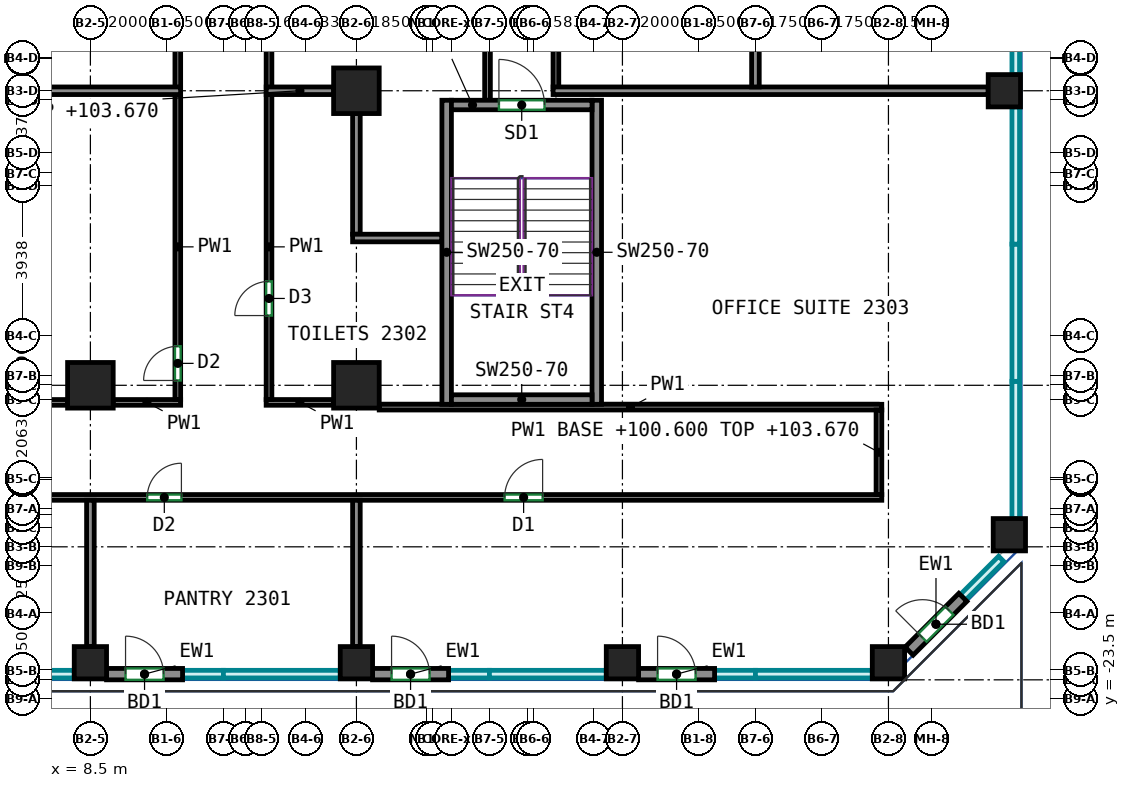
"""IFC4 building model, lengths in metres.
Left out: names, types, materials, properties, quantities, classifications, styles, units other than length and angle.
Written with IfcOpenShell. Run it as: python <this file> out.ifc"""

import sys

from ifc_helpers import new_model, si_unit, direction, frame, frame_2d, origin, origin_2d, place, context, subcontext, project, spatial, rectangle, extrude, source, transform, mapped, element, fill, save


model = new_model("IFC4")
c1 = context("Model", 3, precision=1e-05, world=origin(), true_north=direction((0.0, 1.0)))
c2 = subcontext(c1, "Body", "Model", "MODEL_VIEW")
j1 = project(units=[si_unit("LENGTHUNIT", "METRE"), si_unit("PLANEANGLEUNIT", "RADIAN")], contexts=[c1])
p1 = place(None, origin())
s1 = spatial("IfcSite", under=j1, at=p1, CompositionType="ELEMENT")
p2 = place(p1, origin())
s2 = spatial("IfcBuilding", under=s1, at=p2, CompositionType="ELEMENT")
p3 = place(p2, frame((0.0, 0.0, 100.6)))
s3 = spatial("IfcBuildingStorey", under=s2, at=p3, CompositionType="ELEMENT", Elevation=100.6)
m1 = source(origin(), c2, "Body", "SweptSolid", [
    extrude(rectangle(XDim=0.85, YDim=0.85, at=origin_2d()), origin(), (0.0, 0.0, 1.0), 3.72),
])
p4 = place(p3, frame((8.5, -22.55, 0.0), z_axis=(0.0, 0.0, 1.0), x_axis=(1.0, 0.0, 0.0)))
e1 = element("IfcColumn", 1, at=p4, inside=s3, PredefinedType="COLUMN", context=c2, shape_type="MappedRepresentation", body=[
    mapped(m1, transform((0.0, 0.0, 0.0))),
])
m2 = source(origin(), c2, "Body", "SweptSolid", [
    extrude(rectangle(XDim=1.2, YDim=1.2, at=origin_2d()), origin(), (0.0, 0.0, 1.0), 3.72),
])
p5 = place(p3, frame((8.5, -15.25, 0.0), z_axis=(0.0, 0.0, 1.0), x_axis=(1.0, 0.0, 0.0)))
e2 = element("IfcColumn", 2, at=p5, inside=s3, PredefinedType="COLUMN", context=c2, shape_type="MappedRepresentation", body=[
    mapped(m2, transform((0.0, 0.0, 0.0))),
])
p6 = place(p3, frame((15.5, -22.55, 0.0), z_axis=(0.0, 0.0, 1.0), x_axis=(1.0, 0.0, 0.0)))
e3 = element("IfcColumn", 3, at=p6, inside=s3, PredefinedType="COLUMN", context=c2, shape_type="MappedRepresentation", body=[
    mapped(m1, transform((0.0, 0.0, 0.0))),
])
for number, where, z_axis, x_axis in (
    (4, (15.5, -15.25, 0.0), (0.0, 0.0, 1.0), (1.0, 0.0, 0.0)),
    (5, (15.5, -7.5, 0.0), (0.0, 0.0, 1.0), (1.0, 0.0, 0.0)),
):
    element("IfcColumn", number, at=place(p3, frame(where, z_axis=z_axis, x_axis=x_axis)), inside=s3, PredefinedType="COLUMN", context=c2, shape_type="MappedRepresentation", body=[
        mapped(m2, transform((0.0, 0.0, 0.0))),
    ])
for number, where, z_axis, x_axis in (
    (6, (22.5, -22.55, 0.0), (0.0, 0.0, 1.0), (1.0, 0.0, 0.0)),
    (7, (29.5, -22.55, 0.0), (0.0, 0.0, 1.0), (1.0, 0.0, 0.0)),
    (8, (32.55, -7.5, 0.0), (0.0, 0.0, 1.0), (1.0, 0.0, 0.0)),
    (9, (32.682, -19.182, 0.0), (0.0, 0.0, 1.0), (1.0, 0.0, 0.0)),
):
    element("IfcColumn", number, at=place(p3, frame(where, z_axis=z_axis, x_axis=x_axis)), inside=s3, PredefinedType="COLUMN", context=c2, shape_type="MappedRepresentation", body=[
        mapped(m1, transform((0.0, 0.0, 0.0))),
    ])
m3 = source(origin(), c2, "Body", "SweptSolid", [
    extrude(rectangle(XDim=8.0, YDim=0.25, at=frame_2d((4.0, 0.0))), origin(), (0.0, 0.0, 1.0), 3.72),
])
for number, where, z_axis, x_axis in (
    (10, (17.875, -15.75, 0.0), (0.0, 0.0, 1.0), (0.0, 1.0, 0.0)),
    (11, (21.825, -15.75, 0.0), (0.0, 0.0, 1.0), (0.0, 1.0, 0.0)),
):
    element("IfcWall", number, at=place(p3, frame(where, z_axis=z_axis, x_axis=x_axis)), inside=s3, PredefinedType="SHEAR", context=c2, shape_type="MappedRepresentation", body=[
        mapped(m3, transform((0.0, 0.0, 0.0))),
    ])
m4 = source(origin(), c2, "Body", "SweptSolid", [
    extrude(rectangle(XDim=3.7, YDim=0.25, at=frame_2d((1.85, 0.0))), origin(), (0.0, 0.0, 1.0), 3.72),
])
p7 = place(p3, frame((18.0, -15.625, 0.0), z_axis=(0.0, 0.0, 1.0), x_axis=(1.0, 0.0, 0.0)))
e12 = element("IfcWall", 12, at=p7, inside=s3, PredefinedType="SHEAR", context=c2, shape_type="MappedRepresentation", body=[
    mapped(m4, transform((0.0, 0.0, 0.0))),
])
p8 = place(p3, frame((18.0, -7.875, 0.0), z_axis=(0.0, 0.0, 1.0), x_axis=(1.0, 0.0, 0.0)))
e13 = element("IfcWall", 13, at=p8, inside=s3, PredefinedType="SHEAR", context=c2, shape_type="MappedRepresentation", body=[
    mapped(m4, transform((0.0, 0.0, 0.0))),
])
p9 = place(p8, frame((1.25, 0.0, 0.0)))
e14 = element("IfcOpeningElement", 14, at=p9, cuts=e13, PredefinedType="OPENING", context=c2, shape_type="SweptSolid", body=[
    extrude(rectangle(XDim=1.2, YDim=2.1, at=frame_2d((0.6, 1.05))), frame((0.0, 0.135, 0.0), z_axis=(0.0, -1.0, 0.0), x_axis=(1.0, 0.0, 0.0)), (0.0, 0.0, 1.0), 0.27),
])
m5 = source(origin(), c2, "Body", "SweptSolid", [
    extrude(rectangle(XDim=2.0, YDim=0.3, at=frame_2d((1.0, 0.0))), origin(), (0.0, 0.0, 1.0), 3.72),
])
p10 = place(p3, frame((8.925, -22.85, 0.0), z_axis=(0.0, 0.0, 1.0), x_axis=(1.0, 0.0, 0.0)))
e15 = element("IfcWall", 15, at=p10, inside=s3, PredefinedType="SOLIDWALL", context=c2, shape_type="MappedRepresentation", body=[
    mapped(m5, transform((0.0, 0.0, 0.0))),
])
p11 = place(p10, frame((0.5, 0.0, 0.0)))
e16 = element("IfcOpeningElement", 16, at=p11, cuts=e15, PredefinedType="OPENING", context=c2, shape_type="SweptSolid", body=[
    extrude(rectangle(XDim=1.0, YDim=2.1, at=frame_2d((0.5, 1.05))), frame((0.0, 0.16, 0.0), z_axis=(0.0, -1.0, 0.0), x_axis=(1.0, 0.0, 0.0)), (0.0, 0.0, 1.0), 0.32),
])
p12 = place(p3, frame((15.925, -22.85, 0.0), z_axis=(0.0, 0.0, 1.0), x_axis=(1.0, 0.0, 0.0)))
e17 = element("IfcWall", 17, at=p12, inside=s3, PredefinedType="SOLIDWALL", context=c2, shape_type="MappedRepresentation", body=[
    mapped(m5, transform((0.0, 0.0, 0.0))),
])
p13 = place(p12, frame((0.5, 0.0, 0.0)))
e18 = element("IfcOpeningElement", 18, at=p13, cuts=e17, PredefinedType="OPENING", context=c2, shape_type="SweptSolid", body=[
    extrude(rectangle(XDim=1.0, YDim=2.1, at=frame_2d((0.5, 1.05))), frame((0.0, 0.16, 0.0), z_axis=(0.0, -1.0, 0.0), x_axis=(1.0, 0.0, 0.0)), (0.0, 0.0, 1.0), 0.32),
])
p14 = place(p3, frame((22.925, -22.85, 0.0), z_axis=(0.0, 0.0, 1.0), x_axis=(1.0, 0.0, 0.0)))
e19 = element("IfcWall", 19, at=p14, inside=s3, PredefinedType="SOLIDWALL", context=c2, shape_type="MappedRepresentation", body=[
    mapped(m5, transform((0.0, 0.0, 0.0))),
])
p15 = place(p14, frame((0.5, 0.0, 0.0)))
e20 = element("IfcOpeningElement", 20, at=p15, cuts=e19, PredefinedType="OPENING", context=c2, shape_type="SweptSolid", body=[
    extrude(rectangle(XDim=1.0, YDim=2.1, at=frame_2d((0.5, 1.05))), frame((0.0, 0.16, 0.0), z_axis=(0.0, -1.0, 0.0), x_axis=(1.0, 0.0, 0.0)), (0.0, 0.0, 1.0), 0.32),
])
p16 = place(p3, frame((30.044, -22.244, 0.0), z_axis=(0.0, 0.0, 1.0), x_axis=(0.707045742145, 0.70716781496, 0.0)))
e21 = element("IfcWall", 21, at=p16, inside=s3, PredefinedType="SOLIDWALL", context=c2, shape_type="MappedRepresentation", body=[
    mapped(m5, transform((0.0, 0.0, 0.0))),
])
p17 = place(p16, frame((0.5, 0.0, 0.0)))
e22 = element("IfcOpeningElement", 22, at=p17, cuts=e21, PredefinedType="OPENING", context=c2, shape_type="SweptSolid", body=[
    extrude(rectangle(XDim=1.0, YDim=2.1, at=frame_2d((0.5, 1.05))), frame((0.0, 0.16, 0.0), z_axis=(0.0, -1.0, 0.0), x_axis=(1.0, 0.0, 0.0)), (0.0, 0.0, 1.0), 0.32),
])
p18 = place(p3, frame((-19.325, -18.2, 0.0), z_axis=(0.0, 0.0, 1.0), x_axis=(1.0, 0.0, 0.0)))
e23 = element("IfcWall", 23, at=p18, inside=s3, PredefinedType="PARTITIONING", context=c2, shape_type="SweptSolid", body=[
    extrude(rectangle(XDim=48.65, YDim=0.15, at=frame_2d((24.325, 0.0))), origin(), (0.0, 0.0, 1.0), 3.72),
])
p19 = place(p18, frame((6.208, 0.0, 0.0)))
e24 = element("IfcOpeningElement", 24, at=p19, cuts=e23, PredefinedType="OPENING", context=c2, shape_type="SweptSolid", body=[
    extrude(rectangle(XDim=1.8, YDim=2.1, at=frame_2d((0.9, 1.05))), frame((0.0, 0.085, 0.0), z_axis=(0.0, -1.0, 0.0), x_axis=(1.0, 0.0, 0.0)), (0.0, 0.0, 1.0), 0.17),
])
p20 = place(p18, frame((29.32, 0.0, 0.0)))
e25 = element("IfcOpeningElement", 25, at=p20, cuts=e23, PredefinedType="OPENING", context=c2, shape_type="SweptSolid", body=[
    extrude(rectangle(XDim=0.9, YDim=2.1, at=frame_2d((0.45, 1.05))), frame((0.0, 0.085, 0.0), z_axis=(0.0, -1.0, 0.0), x_axis=(1.0, 0.0, 0.0)), (0.0, 0.0, 1.0), 0.17),
])
p21 = place(p18, frame((38.725, 0.0, 0.0)))
e26 = element("IfcOpeningElement", 26, at=p21, cuts=e23, PredefinedType="OPENING", context=c2, shape_type="SweptSolid", body=[
    extrude(rectangle(XDim=1.0, YDim=2.1, at=frame_2d((0.5, 1.05))), frame((0.0, 0.085, 0.0), z_axis=(0.0, -1.0, 0.0), x_axis=(1.0, 0.0, 0.0)), (0.0, 0.0, 1.0), 0.17),
])
p22 = place(p3, frame((2.1, -15.7, 0.0), z_axis=(0.0, 0.0, 1.0), x_axis=(1.0, 0.0, 0.0)))
e27 = element("IfcWall", 27, at=p22, inside=s3, PredefinedType="PARTITIONING", context=c2, shape_type="SweptSolid", body=[
    extrude(rectangle(XDim=5.8, YDim=0.15, at=frame_2d((2.9, 0.0))), origin(), (0.0, 0.0, 1.0), 3.72),
])
p23 = place(p3, frame((9.1, -15.7, 0.0), z_axis=(0.0, 0.0, 1.0), x_axis=(1.0, 0.0, 0.0)))
e28 = element("IfcWall", 28, at=p23, inside=s3, PredefinedType="PARTITIONING", context=c2, shape_type="SweptSolid", body=[
    extrude(rectangle(XDim=1.775, YDim=0.15, at=frame_2d((0.887, 0.0))), origin(), (0.0, 0.0, 1.0), 3.72),
])
p24 = place(p3, frame((10.8, -15.625, 0.0), z_axis=(0.0, 0.0, 1.0), x_axis=(0.0, 1.0, 0.0)))
e29 = element("IfcWall", 29, at=p24, inside=s3, PredefinedType="PARTITIONING", context=c2, shape_type="SweptSolid", body=[
    extrude(rectangle(XDim=8.035, YDim=0.15, at=frame_2d((4.018, 0.0))), origin(), (0.0, 0.0, 1.0), 3.72),
])
p25 = place(p24, frame((0.502, 0.0, 0.0)))
e30 = element("IfcOpeningElement", 30, at=p25, cuts=e29, PredefinedType="OPENING", context=c2, shape_type="SweptSolid", body=[
    extrude(rectangle(XDim=0.9, YDim=2.1, at=frame_2d((0.45, 1.05))), frame((0.0, 0.085, 0.0), z_axis=(0.0, -1.0, 0.0), x_axis=(1.0, 0.0, 0.0)), (0.0, 0.0, 1.0), 0.17),
])
p26 = place(p3, frame((10.8, -7.41, 0.0), z_axis=(0.0, 0.0, 1.0), x_axis=(0.0, 1.0, 0.0)))
e31 = element("IfcWall", 31, at=p26, inside=s3, PredefinedType="PARTITIONING", context=c2, shape_type="SweptSolid", body=[
    extrude(rectangle(XDim=10.285, YDim=0.15, at=frame_2d((5.143, 0.0))), origin(), (0.0, 0.0, 1.0), 3.72),
])
p27 = place(p26, frame((6.56, 0.0, 0.0)))
e32 = element("IfcOpeningElement", 32, at=p27, cuts=e31, PredefinedType="OPENING", context=c2, shape_type="SweptSolid", body=[
    extrude(rectangle(XDim=0.9, YDim=2.1, at=frame_2d((0.45, 1.05))), frame((0.0, 0.085, 0.0), z_axis=(0.0, -1.0, 0.0), x_axis=(1.0, 0.0, 0.0)), (0.0, 0.0, 1.0), 0.17),
])
p28 = place(p3, frame((13.125, -15.7, 0.0), z_axis=(0.0, 0.0, 1.0), x_axis=(1.0, 0.0, 0.0)))
e33 = element("IfcWall", 33, at=p28, inside=s3, PredefinedType="PARTITIONING", context=c2, shape_type="SweptSolid", body=[
    extrude(rectangle(XDim=1.775, YDim=0.15, at=frame_2d((0.887, 0.0))), origin(), (0.0, 0.0, 1.0), 3.72),
])
p29 = place(p3, frame((16.1, -15.825, 0.0), z_axis=(0.0, 0.0, 1.0), x_axis=(1.0, 0.0, 0.0)))
e34 = element("IfcWall", 34, at=p29, inside=s3, PredefinedType="PARTITIONING", context=c2, shape_type="SweptSolid", body=[
    extrude(rectangle(XDim=13.225, YDim=0.15, at=frame_2d((6.612, 0.0))), origin(), (0.0, 0.0, 1.0), 3.72),
])
p30 = place(p3, frame((13.2, -15.625, 0.0), z_axis=(0.0, 0.0, 1.0), x_axis=(0.0, 1.0, 0.0)))
e35 = element("IfcWall", 35, at=p30, inside=s3, PredefinedType="PARTITIONING", context=c2, shape_type="SweptSolid", body=[
    extrude(rectangle(XDim=8.035, YDim=0.15, at=frame_2d((4.018, 0.0))), origin(), (0.0, 0.0, 1.0), 3.72),
])
p31 = place(p30, frame((2.21, 0.0, 0.0)))
e36 = element("IfcOpeningElement", 36, at=p31, cuts=e35, PredefinedType="OPENING", context=c2, shape_type="SweptSolid", body=[
    extrude(rectangle(XDim=0.9, YDim=2.1, at=frame_2d((0.45, 1.05))), frame((0.0, 0.085, 0.0), z_axis=(0.0, -1.0, 0.0), x_axis=(1.0, 0.0, 0.0)), (0.0, 0.0, 1.0), 0.17),
])
p32 = place(p3, frame((29.25, -18.125, 0.0), z_axis=(0.0, 0.0, 1.0), x_axis=(0.0, 1.0, 0.0)))
e37 = element("IfcWall", 37, at=p32, inside=s3, PredefinedType="PARTITIONING", context=c2, shape_type="SweptSolid", body=[
    extrude(rectangle(XDim=2.225, YDim=0.15, at=frame_2d((1.113, 0.0))), origin(), (0.0, 0.0, 1.0), 3.07),
])
p33 = place(p3, frame((18.95, 4.05, 0.0), z_axis=(0.0, 0.0, 1.0), x_axis=(0.0, -1.0, 0.0)))
e38 = element("IfcWall", 38, at=p33, inside=s3, PredefinedType="PARTITIONING", context=c2, shape_type="SweptSolid", body=[
    extrude(rectangle(XDim=11.8, YDim=0.15, at=frame_2d((5.9, 0.0))), origin(), (0.0, 0.0, 1.0), 3.72),
])
p34 = place(p33, frame((0.4, 0.0, 0.0)))
e39 = element("IfcOpeningElement", 39, at=p34, cuts=e38, PredefinedType="OPENING", context=c2, shape_type="SweptSolid", body=[
    extrude(rectangle(XDim=0.9, YDim=2.1, at=frame_2d((0.45, 1.05))), frame((0.0, 0.085, 0.0), z_axis=(0.0, -1.0, 0.0), x_axis=(1.0, 0.0, 0.0)), (0.0, 0.0, 1.0), 0.17),
])
p35 = place(p3, frame((13.2, -7.41, 0.0), z_axis=(0.0, 0.0, 1.0), x_axis=(0.0, 1.0, 0.0)))
e40 = element("IfcWall", 40, at=p35, inside=s3, PredefinedType="PARTITIONING", context=c2, shape_type="SweptSolid", body=[
    extrude(rectangle(XDim=10.285, YDim=0.15, at=frame_2d((5.143, 0.0))), origin(), (0.0, 0.0, 1.0), 3.72),
])
p36 = place(p3, frame((20.75, -7.41, 0.0), z_axis=(0.0, 0.0, 1.0), x_axis=(0.0, 1.0, 0.0)))
e41 = element("IfcWall", 41, at=p36, inside=s3, PredefinedType="PARTITIONING", context=c2, shape_type="SweptSolid", body=[
    extrude(rectangle(XDim=7.57, YDim=0.15, at=frame_2d((3.785, 0.0))), origin(), (0.0, 0.0, 1.0), 3.72),
])
p37 = place(p36, frame((5.56, 0.0, 0.0)))
e42 = element("IfcOpeningElement", 42, at=p37, cuts=e41, PredefinedType="OPENING", context=c2, shape_type="SweptSolid", body=[
    extrude(rectangle(XDim=0.9, YDim=2.1, at=frame_2d((0.45, 1.05))), frame((0.0, 0.085, 0.0), z_axis=(0.0, -1.0, 0.0), x_axis=(1.0, 0.0, 0.0)), (0.0, 0.0, 1.0), 0.17),
])
for number, where, z_axis, x_axis in (
    (43, (8.5, -22.125, 0.0), (0.0, 0.0, 1.0), (0.0, 1.0, 0.0)),
    (44, (15.5, -22.125, 0.0), (0.0, 0.0, 1.0), (0.0, 1.0, 0.0)),
):
    element("IfcWall", number, at=place(p3, frame(where, z_axis=z_axis, x_axis=x_axis)), inside=s3, PredefinedType="PARTITIONING", context=c2, shape_type="SweptSolid", body=[
        extrude(rectangle(XDim=3.849, YDim=0.2, at=frame_2d((1.925, 0.0))), origin(), (0.0, 0.0, 1.0), 3.72),
    ])
p38 = place(p3, frame((-5.6, -7.5, 0.0), z_axis=(0.0, 0.0, 1.0), x_axis=(1.0, 0.0, 0.0)))
e45 = element("IfcWall", 45, at=p38, inside=s3, PredefinedType="PARTITIONING", context=c2, shape_type="SweptSolid", body=[
    extrude(rectangle(XDim=16.474, YDim=0.2, at=frame_2d((8.237, 0.0))), origin(), (0.0, 0.0, 1.0), 3.07),
])
p39 = place(p3, frame((13.126, -7.5, 0.0), z_axis=(0.0, 0.0, 1.0), x_axis=(1.0, 0.0, 0.0)))
e46 = element("IfcWall", 46, at=p39, inside=s3, PredefinedType="PARTITIONING", context=c2, shape_type="SweptSolid", body=[
    extrude(rectangle(XDim=1.774, YDim=0.2, at=frame_2d((0.887, 0.0))), origin(), (0.0, 0.0, 1.0), 3.07),
])
p40 = place(p3, frame((15.5, -11.275, 0.0), z_axis=(0.0, 0.0, 1.0), x_axis=(0.0, 1.0, 0.0)))
e47 = element("IfcWall", 47, at=p40, inside=s3, PredefinedType="PARTITIONING", context=c2, shape_type="SweptSolid", body=[
    extrude(rectangle(XDim=3.175, YDim=0.2, at=frame_2d((1.587, 0.0))), origin(), (0.0, 0.0, 1.0), 3.72),
])
p41 = place(p3, frame((17.75, -11.375, 0.0), z_axis=(0.0, 0.0, 1.0), x_axis=(-1.0, 0.0, 0.0)))
e48 = element("IfcWall", 48, at=p41, inside=s3, PredefinedType="PARTITIONING", context=c2, shape_type="SweptSolid", body=[
    extrude(rectangle(XDim=2.35, YDim=0.2, at=frame_2d((1.175, 0.0))), origin(), (0.0, 0.0, 1.0), 3.72),
])
p42 = place(p3, frame((20.676, -7.5, 0.0), z_axis=(0.0, 0.0, 1.0), x_axis=(1.0, 0.0, 0.0)))
e49 = element("IfcWall", 49, at=p42, inside=s3, PredefinedType="PARTITIONING", context=c2, shape_type="SweptSolid", body=[
    extrude(rectangle(XDim=11.449, YDim=0.2, at=frame_2d((5.725, 0.0))), origin(), (0.0, 0.0, 1.0), 3.72),
])
p43 = place(p3, frame((26.0, -7.4, 0.0), z_axis=(0.0, 0.0, 1.0), x_axis=(0.0, 1.0, 0.0)))
e50 = element("IfcWall", 50, at=p43, inside=s3, PredefinedType="PARTITIONING", context=c2, shape_type="SweptSolid", body=[
    extrude(rectangle(XDim=7.55, YDim=0.2, at=frame_2d((3.775, 0.0))), origin(), (0.0, 0.0, 1.0), 3.72),
])
p44 = place(p11, origin())
e51 = element("IfcDoor", 51, at=p44, inside=s3, OperationType="SINGLE_SWING_LEFT", PredefinedType="DOOR", context=c2, shape_type="SweptSolid", body=[
    extrude(rectangle(XDim=1.0, YDim=2.1, at=frame_2d((0.5, 1.05))), frame((0.0, 0.025, 0.0), z_axis=(0.0, -1.0, 0.0), x_axis=(1.0, 0.0, 0.0)), (0.0, 0.0, 1.0), 0.05),
])
fill(e16, e51)
p45 = place(p13, origin())
e52 = element("IfcDoor", 52, at=p45, inside=s3, OperationType="SINGLE_SWING_LEFT", PredefinedType="DOOR", context=c2, shape_type="SweptSolid", body=[
    extrude(rectangle(XDim=1.0, YDim=2.1, at=frame_2d((0.5, 1.05))), frame((0.0, 0.025, 0.0), z_axis=(0.0, -1.0, 0.0), x_axis=(1.0, 0.0, 0.0)), (0.0, 0.0, 1.0), 0.05),
])
fill(e18, e52)
p46 = place(p15, origin())
e53 = element("IfcDoor", 53, at=p46, inside=s3, OperationType="SINGLE_SWING_LEFT", PredefinedType="DOOR", context=c2, shape_type="SweptSolid", body=[
    extrude(rectangle(XDim=1.0, YDim=2.1, at=frame_2d((0.5, 1.05))), frame((0.0, 0.025, 0.0), z_axis=(0.0, -1.0, 0.0), x_axis=(1.0, 0.0, 0.0)), (0.0, 0.0, 1.0), 0.05),
])
fill(e20, e53)
p47 = place(p17, origin())
e54 = element("IfcDoor", 54, at=p47, inside=s3, OperationType="SINGLE_SWING_LEFT", PredefinedType="DOOR", context=c2, shape_type="SweptSolid", body=[
    extrude(rectangle(XDim=1.0, YDim=2.1, at=frame_2d((0.5, 1.05))), frame((0.0, 0.025, 0.0), z_axis=(0.0, -1.0, 0.0), x_axis=(1.0, 0.0, 0.0)), (0.0, 0.0, 1.0), 0.05),
])
fill(e22, e54)
p48 = place(p9, origin())
e55 = element("IfcDoor", 55, at=p48, inside=s3, OperationType="DOUBLE_DOOR_SINGLE_SWING", PredefinedType="DOOR", context=c2, shape_type="SweptSolid", body=[
    extrude(rectangle(XDim=1.2, YDim=2.1, at=frame_2d((0.6, 1.05))), frame((0.0, 0.025, 0.0), z_axis=(0.0, -1.0, 0.0), x_axis=(1.0, 0.0, 0.0)), (0.0, 0.0, 1.0), 0.05),
])
fill(e14, e55)
p49 = place(p20, origin())
e56 = element("IfcDoor", 56, at=p49, inside=s3, OperationType="SINGLE_SWING_RIGHT", PredefinedType="DOOR", context=c2, shape_type="SweptSolid", body=[
    extrude(rectangle(XDim=0.9, YDim=2.1, at=frame_2d((0.45, 1.05))), frame((0.0, 0.025, 0.0), z_axis=(0.0, -1.0, 0.0), x_axis=(1.0, 0.0, 0.0)), (0.0, 0.0, 1.0), 0.05),
])
fill(e25, e56)
p50 = place(p21, origin())
e57 = element("IfcDoor", 57, at=p50, inside=s3, OperationType="SINGLE_SWING_RIGHT", PredefinedType="DOOR", context=c2, shape_type="SweptSolid", body=[
    extrude(rectangle(XDim=1.0, YDim=2.1, at=frame_2d((0.5, 1.05))), frame((0.0, 0.025, 0.0), z_axis=(0.0, -1.0, 0.0), x_axis=(1.0, 0.0, 0.0)), (0.0, 0.0, 1.0), 0.05),
])
fill(e26, e57)
p51 = place(p25, origin())
e58 = element("IfcDoor", 58, at=p51, inside=s3, OperationType="SINGLE_SWING_LEFT", PredefinedType="DOOR", context=c2, shape_type="SweptSolid", body=[
    extrude(rectangle(XDim=0.9, YDim=2.1, at=frame_2d((0.45, 1.05))), frame((0.0, 0.025, 0.0), z_axis=(0.0, -1.0, 0.0), x_axis=(1.0, 0.0, 0.0)), (0.0, 0.0, 1.0), 0.05),
])
fill(e30, e58)
p52 = place(p31, origin())
e59 = element("IfcDoor", 59, at=p52, inside=s3, OperationType="SINGLE_SWING_LEFT", PredefinedType="DOOR", context=c2, shape_type="SweptSolid", body=[
    extrude(rectangle(XDim=0.9, YDim=2.1, at=frame_2d((0.45, 1.05))), frame((0.0, 0.025, 0.0), z_axis=(0.0, -1.0, 0.0), x_axis=(1.0, 0.0, 0.0)), (0.0, 0.0, 1.0), 0.05),
])
fill(e36, e59)
save(model, sys.argv[1])
